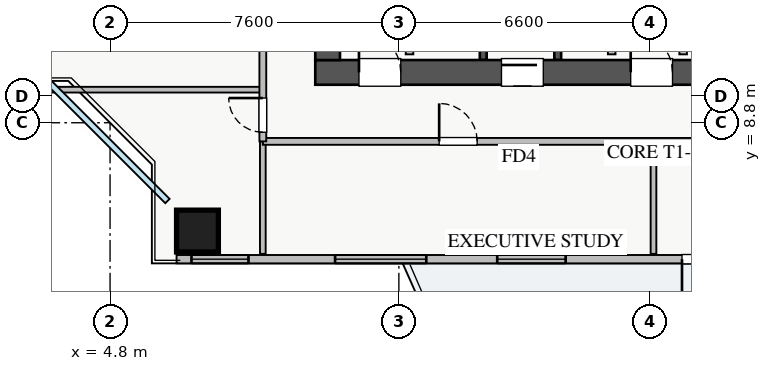
"""IFC4 building model, lengths in metres.
Left out: names, types, materials, properties, quantities, classifications, styles, units other than length and angle.
Written with IfcOpenShell. Run it as: python <this file> out.ifc"""

import sys

from ifc_helpers import new_model, si_unit, direction, frame, frame_2d, origin, origin_2d, place, context, subcontext, project, spatial, rectangle, extrude, source, transform, mapped, element, fill, save


model = new_model("IFC4")
c1 = context("Model", 3, precision=1e-05, world=origin(), true_north=direction((0.0, 1.0)))
c2 = subcontext(c1, "Body", "Model", "MODEL_VIEW")
j1 = project(units=[si_unit("LENGTHUNIT", "METRE"), si_unit("PLANEANGLEUNIT", "RADIAN")], contexts=[c1])
p1 = place(None, origin())
s1 = spatial("IfcSite", under=j1, at=p1, CompositionType="ELEMENT")
p2 = place(p1, origin())
s2 = spatial("IfcBuilding", under=s1, at=p2, CompositionType="ELEMENT")
p3 = place(p2, frame((0.0, 0.0, 100.25)))
s3 = spatial("IfcBuildingStorey", under=s2, at=p3, CompositionType="ELEMENT", Elevation=100.25)
for number, where, z_axis, x_axis in (
    (1, (14.62, 10.45, 0.0), (0.0, 0.0, 1.0), (0.0, 1.0, 0.0)),
    (2, (16.58, 10.45, 0.0), (0.0, 0.0, 1.0), (0.0, 1.0, 0.0)),
):
    element("IfcWall", number, at=place(p3, frame(where, z_axis=z_axis, x_axis=x_axis)), inside=s3, PredefinedType="SHEAR", context=c2, shape_type="SweptSolid", body=[
        extrude(rectangle(XDim=2.35, YDim=0.18, at=frame_2d((1.175, 0.0))), origin(), (0.0, 0.0, 1.0), 3.07),
    ])
p4 = place(p3, frame((10.2, 10.125, 0.0), z_axis=(0.0, 0.0, 1.0), x_axis=(1.0, 0.0, 0.0)))
e3 = element("IfcWall", 3, at=p4, inside=s3, PredefinedType="SHEAR", context=c2, shape_type="SweptSolid", body=[
    extrude(rectangle(XDim=17.6, YDim=0.65, at=frame_2d((8.8, 0.0))), origin(), (0.0, 0.0, 1.0), 3.25),
])
p5 = place(p4, frame((1.15, 0.0, 0.0)))
e4 = element("IfcOpeningElement", 4, at=p5, cuts=e3, PredefinedType="OPENING", context=c2, shape_type="SweptSolid", body=[
    extrude(rectangle(XDim=1.1, YDim=2.05, at=frame_2d((0.55, 1.025))), frame((0.0, 0.335, 0.0), z_axis=(0.0, -1.0, 0.0), x_axis=(1.0, 0.0, 0.0)), (0.0, 0.0, 1.0), 0.67),
])
p6 = place(p4, frame((8.3, 0.0, 0.0)))
e5 = element("IfcOpeningElement", 5, at=p6, cuts=e3, PredefinedType="OPENING", context=c2, shape_type="SweptSolid", body=[
    extrude(rectangle(XDim=1.1, YDim=2.05, at=frame_2d((0.55, 1.025))), frame((0.0, 0.335, 0.0), z_axis=(0.0, -1.0, 0.0), x_axis=(1.0, 0.0, 0.0)), (0.0, 0.0, 1.0), 0.67),
])
p7 = place(p4, frame((4.9, 0.0, 0.0)))
e6 = element("IfcOpeningElement", 6, at=p7, cuts=e3, PredefinedType="OPENING", context=c2, shape_type="SweptSolid", body=[
    extrude(rectangle(XDim=1.1, YDim=2.05, at=frame_2d((0.55, 1.025))), frame((0.0, 0.335, 0.0), z_axis=(0.0, -1.0, 0.0), x_axis=(1.0, 0.0, 0.0)), (0.0, 0.0, 1.0), 0.67),
])
p8 = place(p4, frame((14.74, 0.0, 0.0)))
e7 = element("IfcOpeningElement", 7, at=p8, cuts=e3, PredefinedType="OPENING", context=c2, shape_type="SweptSolid", body=[
    extrude(rectangle(XDim=1.0, YDim=2.05, at=frame_2d((0.5, 1.025))), frame((0.0, 0.335, 0.0), z_axis=(0.0, -1.0, 0.0), x_axis=(1.0, 0.0, 0.0)), (0.0, 0.0, 1.0), 0.67),
])
p9 = place(p4, frame((10.64, 0.0, 0.0)))
e8 = element("IfcOpeningElement", 8, at=p9, cuts=e3, PredefinedType="OPENING", context=c2, shape_type="SweptSolid", body=[
    extrude(rectangle(XDim=1.0, YDim=2.05, at=frame_2d((0.5, 1.025))), frame((0.0, 0.335, 0.0), z_axis=(0.0, -1.0, 0.0), x_axis=(1.0, 0.0, 0.0)), (0.0, 0.0, 1.0), 0.67),
])
p10 = place(p4, frame((13.09, 0.0, 0.0)))
e9 = element("IfcOpeningElement", 9, at=p10, cuts=e3, PredefinedType="OPENING", context=c2, shape_type="SweptSolid", body=[
    extrude(rectangle(XDim=1.0, YDim=2.05, at=frame_2d((0.5, 1.025))), frame((0.0, 0.335, 0.0), z_axis=(0.0, -1.0, 0.0), x_axis=(1.0, 0.0, 0.0)), (0.0, 0.0, 1.0), 0.67),
])
p11 = place(p3, frame((10.525, 10.45, 0.0), z_axis=(0.0, 0.0, 1.0), x_axis=(0.0, 1.0, 0.0)))
e10 = element("IfcWall", 10, at=p11, inside=s3, PredefinedType="SHEAR", context=c2, shape_type="SweptSolid", body=[
    extrude(rectangle(XDim=5.9, YDim=0.65, at=frame_2d((2.95, 0.0))), origin(), (0.0, 0.0, 1.0), 3.25),
])
m1 = source(origin(), c2, "Body", "SweptSolid", [
    extrude(rectangle(XDim=1.1, YDim=1.1, at=origin_2d()), origin(), (0.0, 0.0, 1.0), 3.25),
])
p12 = place(p3, frame((7.1, 5.95, 0.0), z_axis=(0.0, 0.0, 1.0), x_axis=(1.0, 0.0, 0.0)))
e11 = element("IfcColumn", 11, at=p12, inside=s3, PredefinedType="COLUMN", context=c2, shape_type="MappedRepresentation", body=[
    mapped(m1, transform((0.0, 0.0, 0.0), x_axis=(1.0, 0.0, 0.0), y_axis=(0.0, 1.0, 0.0), z_axis=(0.0, 0.0, 1.0), scale=1.0)),
])
p13 = place(p3, frame((6.55, 5.21, 0.0), z_axis=(0.0, 0.0, 1.0), x_axis=(1.0, 0.0, 0.0)))
e12 = element("IfcWall", 12, at=p13, inside=s3, PredefinedType="STANDARD", context=c2, shape_type="SweptSolid", body=[
    extrude(rectangle(XDim=24.9, YDim=0.22, at=frame_2d((12.45, 0.0))), origin(), (0.0, 0.0, 1.0), 2.61),
])
p14 = place(p13, frame((13.3, 0.0, 0.0)))
e13 = element("IfcOpeningElement", 13, at=p14, cuts=e12, PredefinedType="OPENING", context=c2, shape_type="SweptSolid", body=[
    extrude(rectangle(XDim=1.2, YDim=2.1, at=frame_2d((0.6, 1.05))), frame((0.0, 0.12, 0.0), z_axis=(0.0, -1.0, 0.0), x_axis=(1.0, 0.0, 0.0)), (0.0, 0.0, 1.0), 0.24),
])
p15 = place(p13, frame((0.393, 0.0, 0.9)))
e14 = element("IfcOpeningElement", 14, at=p15, cuts=e12, PredefinedType="OPENING", context=c2, shape_type="SweptSolid", body=[
    extrude(rectangle(XDim=1.5, YDim=1.5, at=frame_2d((0.75, 0.75))), frame((0.0, 0.12, 0.0), z_axis=(0.0, -1.0, 0.0), x_axis=(1.0, 0.0, 0.0)), (0.0, 0.0, 1.0), 0.24),
])
p16 = place(p13, frame((8.438, 0.0, 0.9)))
e15 = element("IfcOpeningElement", 15, at=p16, cuts=e12, PredefinedType="OPENING", context=c2, shape_type="SweptSolid", body=[
    extrude(rectangle(XDim=1.8, YDim=1.45, at=frame_2d((0.9, 0.725))), frame((0.0, 0.12, 0.0), z_axis=(0.0, -1.0, 0.0), x_axis=(1.0, 0.0, 0.0)), (0.0, 0.0, 1.0), 0.24),
])
p17 = place(p13, frame((14.813, 0.0, 0.9)))
e16 = element("IfcOpeningElement", 16, at=p17, cuts=e12, PredefinedType="OPENING", context=c2, shape_type="SweptSolid", body=[
    extrude(rectangle(XDim=1.5, YDim=1.45, at=frame_2d((0.75, 0.725))), frame((0.0, 0.12, 0.0), z_axis=(0.0, -1.0, 0.0), x_axis=(1.0, 0.0, 0.0)), (0.0, 0.0, 1.0), 0.24),
])
p18 = place(p13, frame((20.738, 0.0, 0.9)))
e17 = element("IfcOpeningElement", 17, at=p18, cuts=e12, PredefinedType="OPENING", context=c2, shape_type="SweptSolid", body=[
    extrude(rectangle(XDim=2.1, YDim=1.48, at=frame_2d((1.05, 0.74))), frame((0.0, 0.12, 0.0), z_axis=(0.0, -1.0, 0.0), x_axis=(1.0, 0.0, 0.0)), (0.0, 0.0, 1.0), 0.24),
])
p19 = place(p13, frame((4.171, 0.0, 0.9)))
e18 = element("IfcOpeningElement", 18, at=p19, cuts=e12, PredefinedType="OPENING", context=c2, shape_type="SweptSolid", body=[
    extrude(rectangle(XDim=2.4, YDim=1.5, at=frame_2d((1.2, 0.75))), frame((0.0, 0.12, 0.0), z_axis=(0.0, -1.0, 0.0), x_axis=(1.0, 0.0, 0.0)), (0.0, 0.0, 1.0), 0.24),
])
for number, where, z_axis, x_axis in (
    (19, (12.68, 10.6, 0.0), (0.0, 0.0, 1.0), (0.0, 1.0, 0.0)),
    (20, (18.0, 10.6, 0.0), (0.0, 0.0, 1.0), (0.0, 1.0, 0.0)),
    (21, (19.88, 10.6, 0.0), (0.0, 0.0, 1.0), (0.0, 1.0, 0.0)),
):
    element("IfcWall", number, at=place(p3, frame(where, z_axis=z_axis, x_axis=x_axis)), inside=s3, PredefinedType="PARTITIONING", context=c2, shape_type="SweptSolid", body=[
        extrude(rectangle(XDim=2.21, YDim=0.2, at=frame_2d((1.105, 0.0))), origin(), (0.0, 0.0, 1.0), 3.07),
    ])
p20 = place(p3, frame((19.1, 5.35, 0.0), z_axis=(0.0, 0.0, 1.0), x_axis=(0.0, 1.0, 0.0)))
e22 = element("IfcWall", 22, at=p20, inside=s3, PredefinedType="PARTITIONING", context=c2, shape_type="SweptSolid", body=[
    extrude(rectangle(XDim=2.96, YDim=0.15, at=frame_2d((1.48, 0.0))), origin(), (0.0, 0.0, 1.0), 2.821),
])
p21 = place(p3, frame((8.82, 5.35, 0.0), z_axis=(0.0, 0.0, 1.0), x_axis=(0.0, 1.0, 0.0)))
e23 = element("IfcWall", 23, at=p21, inside=s3, PredefinedType="PARTITIONING", context=c2, shape_type="SweptSolid", body=[
    extrude(rectangle(XDim=2.96, YDim=0.15, at=frame_2d((1.48, 0.0))), origin(), (0.0, 0.0, 1.0), 3.07),
])
p22 = place(p3, frame((8.82, 8.31, 0.0), z_axis=(0.0, 0.0, 1.0), x_axis=(1.0, 0.0, 0.0)))
e24 = element("IfcWall", 24, at=p22, inside=s3, PredefinedType="PARTITIONING", context=c2, shape_type="SweptSolid", body=[
    extrude(rectangle(XDim=23.58, YDim=0.18, at=frame_2d((11.79, 0.0))), origin(), (0.0, 0.0, 1.0), 3.07),
])
p23 = place(p22, frame((4.64, 0.0, 0.0)))
e25 = element("IfcOpeningElement", 25, at=p23, cuts=e24, PredefinedType="OPENING", context=c2, shape_type="SweptSolid", body=[
    extrude(rectangle(XDim=1.0, YDim=2.05, at=frame_2d((0.5, 1.025))), frame((0.0, 0.1, 0.0), z_axis=(0.0, -1.0, 0.0), x_axis=(1.0, 0.0, 0.0)), (0.0, 0.0, 1.0), 0.2),
])
p24 = place(p22, frame((16.22, 0.0, 0.0)))
e26 = element("IfcOpeningElement", 26, at=p24, cuts=e24, PredefinedType="OPENING", context=c2, shape_type="SweptSolid", body=[
    extrude(rectangle(XDim=1.0, YDim=2.05, at=frame_2d((0.5, 1.025))), frame((0.0, 0.1, 0.0), z_axis=(0.0, -1.0, 0.0), x_axis=(1.0, 0.0, 0.0)), (0.0, 0.0, 1.0), 0.2),
])
p25 = place(p3, frame((1.35, 9.67, 0.0), z_axis=(0.0, 0.0, 1.0), x_axis=(1.0, 0.0, 0.0)))
e27 = element("IfcWall", 27, at=p25, inside=s3, PredefinedType="PARTITIONING", context=c2, shape_type="SweptSolid", body=[
    extrude(rectangle(XDim=7.47, YDim=0.15, at=frame_2d((3.735, 0.0))), origin(), (0.0, 0.0, 1.0), 3.07),
])
p26 = place(p3, frame((8.82, 8.31, 0.0), z_axis=(0.0, 0.0, 1.0), x_axis=(0.0, 1.0, 0.0)))
e28 = element("IfcWall", 28, at=p26, inside=s3, PredefinedType="PARTITIONING", context=c2, shape_type="SweptSolid", body=[
    extrude(rectangle(XDim=29.13, YDim=0.18, at=frame_2d((14.565, 0.0))), origin(), (0.0, 0.0, 1.0), 3.07),
])
p27 = place(p26, frame((27.94, 0.0, 0.0)))
e29 = element("IfcOpeningElement", 29, at=p27, cuts=e28, PredefinedType="OPENING", context=c2, shape_type="SweptSolid", body=[
    extrude(rectangle(XDim=0.9, YDim=2.05, at=frame_2d((0.45, 1.025))), frame((0.0, 0.1, 0.0), z_axis=(0.0, -1.0, 0.0), x_axis=(1.0, 0.0, 0.0)), (0.0, 0.0, 1.0), 0.2),
])
p28 = place(p26, frame((0.24, 0.0, 0.0)))
e30 = element("IfcOpeningElement", 30, at=p28, cuts=e28, PredefinedType="OPENING", context=c2, shape_type="SweptSolid", body=[
    extrude(rectangle(XDim=0.9, YDim=2.05, at=frame_2d((0.45, 1.025))), frame((0.0, 0.1, 0.0), z_axis=(0.0, -1.0, 0.0), x_axis=(1.0, 0.0, 0.0)), (0.0, 0.0, 1.0), 0.2),
])
p29 = place(p26, frame((3.69, 0.0, 0.0)))
e31 = element("IfcOpeningElement", 31, at=p29, cuts=e28, PredefinedType="OPENING", context=c2, shape_type="SweptSolid", body=[
    extrude(rectangle(XDim=1.0, YDim=2.05, at=frame_2d((0.5, 1.025))), frame((0.0, 0.1, 0.0), z_axis=(0.0, -1.0, 0.0), x_axis=(1.0, 0.0, 0.0)), (0.0, 0.0, 1.0), 0.2),
])
p30 = place(p26, frame((20.305, 0.0, 0.0)))
e32 = element("IfcOpeningElement", 32, at=p30, cuts=e28, PredefinedType="OPENING", context=c2, shape_type="SweptSolid", body=[
    extrude(rectangle(XDim=1.0, YDim=2.05, at=frame_2d((0.5, 1.025))), frame((0.0, 0.1, 0.0), z_axis=(0.0, -1.0, 0.0), x_axis=(1.0, 0.0, 0.0)), (0.0, 0.0, 1.0), 0.2),
])
m2 = source(origin(), c2, "Body", "SweptSolid", [
    extrude(rectangle(XDim=1.2, YDim=2.1, at=frame_2d((0.6, 1.05))), frame((0.0, 0.025, 0.0), z_axis=(0.0, -1.0, 0.0), x_axis=(1.0, 0.0, 0.0)), (0.0, 0.0, 1.0), 0.05),
])
p31 = place(p14, frame((1.2, 0.0, 0.0), z_axis=(0.0, 0.0, 1.0), x_axis=(-1.0, 0.0, 0.0)))
e33 = element("IfcDoor", 33, at=p31, inside=s3, OperationType="SINGLE_SWING_LEFT", PredefinedType="DOOR", context=c2, shape_type="MappedRepresentation", body=[
    mapped(m2, transform((0.0, 0.0, 0.0), x_axis=(1.0, 0.0, 0.0), y_axis=(0.0, 1.0, 0.0), z_axis=(0.0, 0.0, 1.0), scale=1.0)),
])
fill(e13, e33)
m3 = source(origin(), c2, "Body", "SweptSolid", [
    extrude(rectangle(XDim=1.5, YDim=1.5, at=frame_2d((0.75, 0.75))), frame((0.0, 0.03, 0.0), z_axis=(0.0, -1.0, 0.0), x_axis=(1.0, 0.0, 0.0)), (0.0, 0.0, 1.0), 0.06),
])
p32 = place(p15, origin())
e34 = element("IfcWindow", 34, at=p32, inside=s3, PartitioningType="TRIPLE_PANEL_VERTICAL", PredefinedType="WINDOW", context=c2, shape_type="MappedRepresentation", body=[
    mapped(m3, transform((0.0, 0.0, 0.0), x_axis=(1.0, 0.0, 0.0), y_axis=(0.0, 1.0, 0.0), z_axis=(0.0, 0.0, 1.0), scale=1.0)),
])
fill(e14, e34)
m4 = source(origin(), c2, "Body", "SweptSolid", [
    extrude(rectangle(XDim=1.8, YDim=1.45, at=frame_2d((0.9, 0.725))), frame((0.0, 0.03, 0.0), z_axis=(0.0, -1.0, 0.0), x_axis=(1.0, 0.0, 0.0)), (0.0, 0.0, 1.0), 0.06),
])
p33 = place(p16, origin())
e35 = element("IfcWindow", 35, at=p33, inside=s3, PartitioningType="DOUBLE_PANEL_VERTICAL", PredefinedType="WINDOW", context=c2, shape_type="MappedRepresentation", body=[
    mapped(m4, transform((0.0, 0.0, 0.0), x_axis=(1.0, 0.0, 0.0), y_axis=(0.0, 1.0, 0.0), z_axis=(0.0, 0.0, 1.0), scale=1.0)),
])
fill(e15, e35)
m5 = source(origin(), c2, "Body", "SweptSolid", [
    extrude(rectangle(XDim=1.1, YDim=2.05, at=frame_2d((0.55, 1.025))), frame((0.0, 0.025, 0.0), z_axis=(0.0, -1.0, 0.0), x_axis=(1.0, 0.0, 0.0)), (0.0, 0.0, 1.0), 0.05),
])
p34 = place(p5, origin())
e36 = element("IfcDoor", 36, at=p34, inside=s3, OperationType="SINGLE_SWING_LEFT", PredefinedType="DOOR", context=c2, shape_type="MappedRepresentation", body=[
    mapped(m5, transform((0.0, 0.0, 0.0), x_axis=(1.0, 0.0, 0.0), y_axis=(0.0, 1.0, 0.0), z_axis=(0.0, 0.0, 1.0), scale=1.0)),
])
fill(e4, e36)
p35 = place(p6, origin())
e37 = element("IfcDoor", 37, at=p35, inside=s3, OperationType="SINGLE_SWING_LEFT", PredefinedType="DOOR", context=c2, shape_type="MappedRepresentation", body=[
    mapped(m5, transform((0.0, 0.0, 0.0), x_axis=(1.0, 0.0, 0.0), y_axis=(0.0, 1.0, 0.0), z_axis=(0.0, 0.0, 1.0), scale=1.0)),
])
fill(e5, e37)
p36 = place(p7, origin())
e38 = element("IfcDoor", 38, at=p36, inside=s3, OperationType="SLIDING_TO_RIGHT", PredefinedType="DOOR", context=c2, shape_type="MappedRepresentation", body=[
    mapped(m5, transform((0.0, 0.0, 0.0), x_axis=(1.0, 0.0, 0.0), y_axis=(0.0, 1.0, 0.0), z_axis=(0.0, 0.0, 1.0), scale=1.0)),
])
fill(e6, e38)
m6 = source(origin(), c2, "Body", "SweptSolid", [
    extrude(rectangle(XDim=1.0, YDim=2.05, at=frame_2d((0.5, 1.025))), frame((0.0, 0.025, 0.0), z_axis=(0.0, -1.0, 0.0), x_axis=(1.0, 0.0, 0.0)), (0.0, 0.0, 1.0), 0.05),
])
p37 = place(p23, origin())
e39 = element("IfcDoor", 39, at=p37, inside=s3, OperationType="SINGLE_SWING_LEFT", PredefinedType="DOOR", context=c2, shape_type="MappedRepresentation", body=[
    mapped(m6, transform((0.0, 0.0, 0.0), x_axis=(1.0, 0.0, 0.0), y_axis=(0.0, 1.0, 0.0), z_axis=(0.0, 0.0, 1.0), scale=1.0)),
])
fill(e25, e39)
m7 = source(origin(), c2, "Body", "SweptSolid", [
    extrude(rectangle(XDim=0.9, YDim=2.05, at=frame_2d((0.45, 1.025))), frame((0.0, 0.025, 0.0), z_axis=(0.0, -1.0, 0.0), x_axis=(1.0, 0.0, 0.0)), (0.0, 0.0, 1.0), 0.05),
])
p38 = place(p28, origin())
e40 = element("IfcDoor", 40, at=p38, inside=s3, OperationType="SINGLE_SWING_RIGHT", PredefinedType="DOOR", context=c2, shape_type="MappedRepresentation", body=[
    mapped(m7, transform((0.0, 0.0, 0.0), x_axis=(1.0, 0.0, 0.0), y_axis=(0.0, 1.0, 0.0), z_axis=(0.0, 0.0, 1.0), scale=1.0)),
])
fill(e30, e40)
m8 = source(origin(), c2, "Body", "SweptSolid", [
    extrude(rectangle(XDim=2.4, YDim=1.5, at=frame_2d((1.2, 0.75))), frame((0.0, 0.03, 0.0), z_axis=(0.0, -1.0, 0.0), x_axis=(1.0, 0.0, 0.0)), (0.0, 0.0, 1.0), 0.06),
])
p39 = place(p19, origin())
e41 = element("IfcWindow", 41, at=p39, inside=s3, PartitioningType="TRIPLE_PANEL_VERTICAL", PredefinedType="WINDOW", context=c2, shape_type="MappedRepresentation", body=[
    mapped(m8, transform((0.0, 0.0, 0.0), x_axis=(1.0, 0.0, 0.0), y_axis=(0.0, 1.0, 0.0), z_axis=(0.0, 0.0, 1.0), scale=1.0)),
])
fill(e18, e41)
save(model, sys.argv[1])
